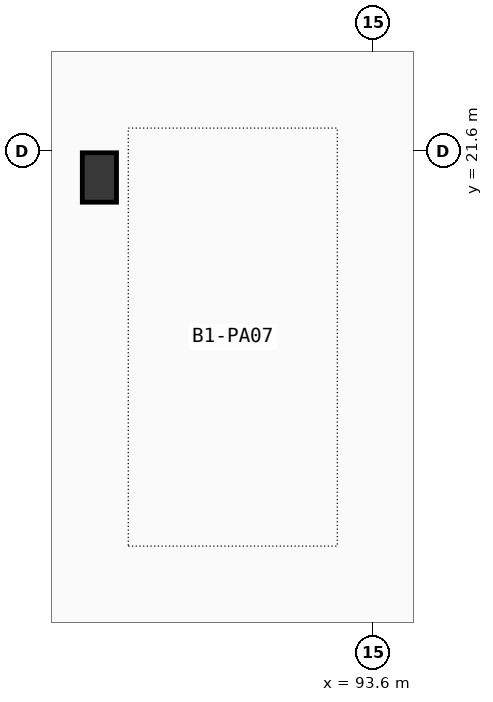
"""IFC4 building model, lengths in metres.
Left out: names, types, materials, properties, quantities, classifications, styles, units other than length and angle.
Written with IfcOpenShell. Run it as: python <this file> out.ifc"""

import sys

from ifc_helpers import new_model, si_unit, direction, frame, origin, origin_2d, place, context, subcontext, project, spatial, rectangle, extrude, element, save


model = new_model("IFC4")
c1 = context("Model", 3, precision=1e-05, world=origin(), true_north=direction((0.0, 1.0)))
c2 = subcontext(c1, "Body", "Model", "MODEL_VIEW")
j1 = project(units=[si_unit("LENGTHUNIT", "METRE"), si_unit("PLANEANGLEUNIT", "RADIAN")], contexts=[c1])
p1 = place(None, origin())
s1 = spatial("IfcSite", under=j1, at=p1, CompositionType="ELEMENT")
p2 = place(p1, origin())
s2 = spatial("IfcBuilding", under=s1, at=p2, CompositionType="ELEMENT")
p3 = place(p2, frame((0.0, 0.0, -4.2)))
s3 = spatial("IfcBuildingStorey", under=s2, at=p3, CompositionType="ELEMENT", Elevation=-4.2)
p4 = place(p3, frame((90.0, 21.25, 0.0), z_axis=(0.0, 0.0, 1.0), x_axis=(1.0, 0.0, 0.0)))
e1 = element("IfcColumn", 1, at=p4, inside=s3, PredefinedType="PILASTER", context=c2, shape_type="SweptSolid", body=[
    extrude(rectangle(XDim=0.45, YDim=0.65, at=origin_2d()), origin(), (0.0, 0.0, 1.0), 4.2),
])
save(model, sys.argv[1])
